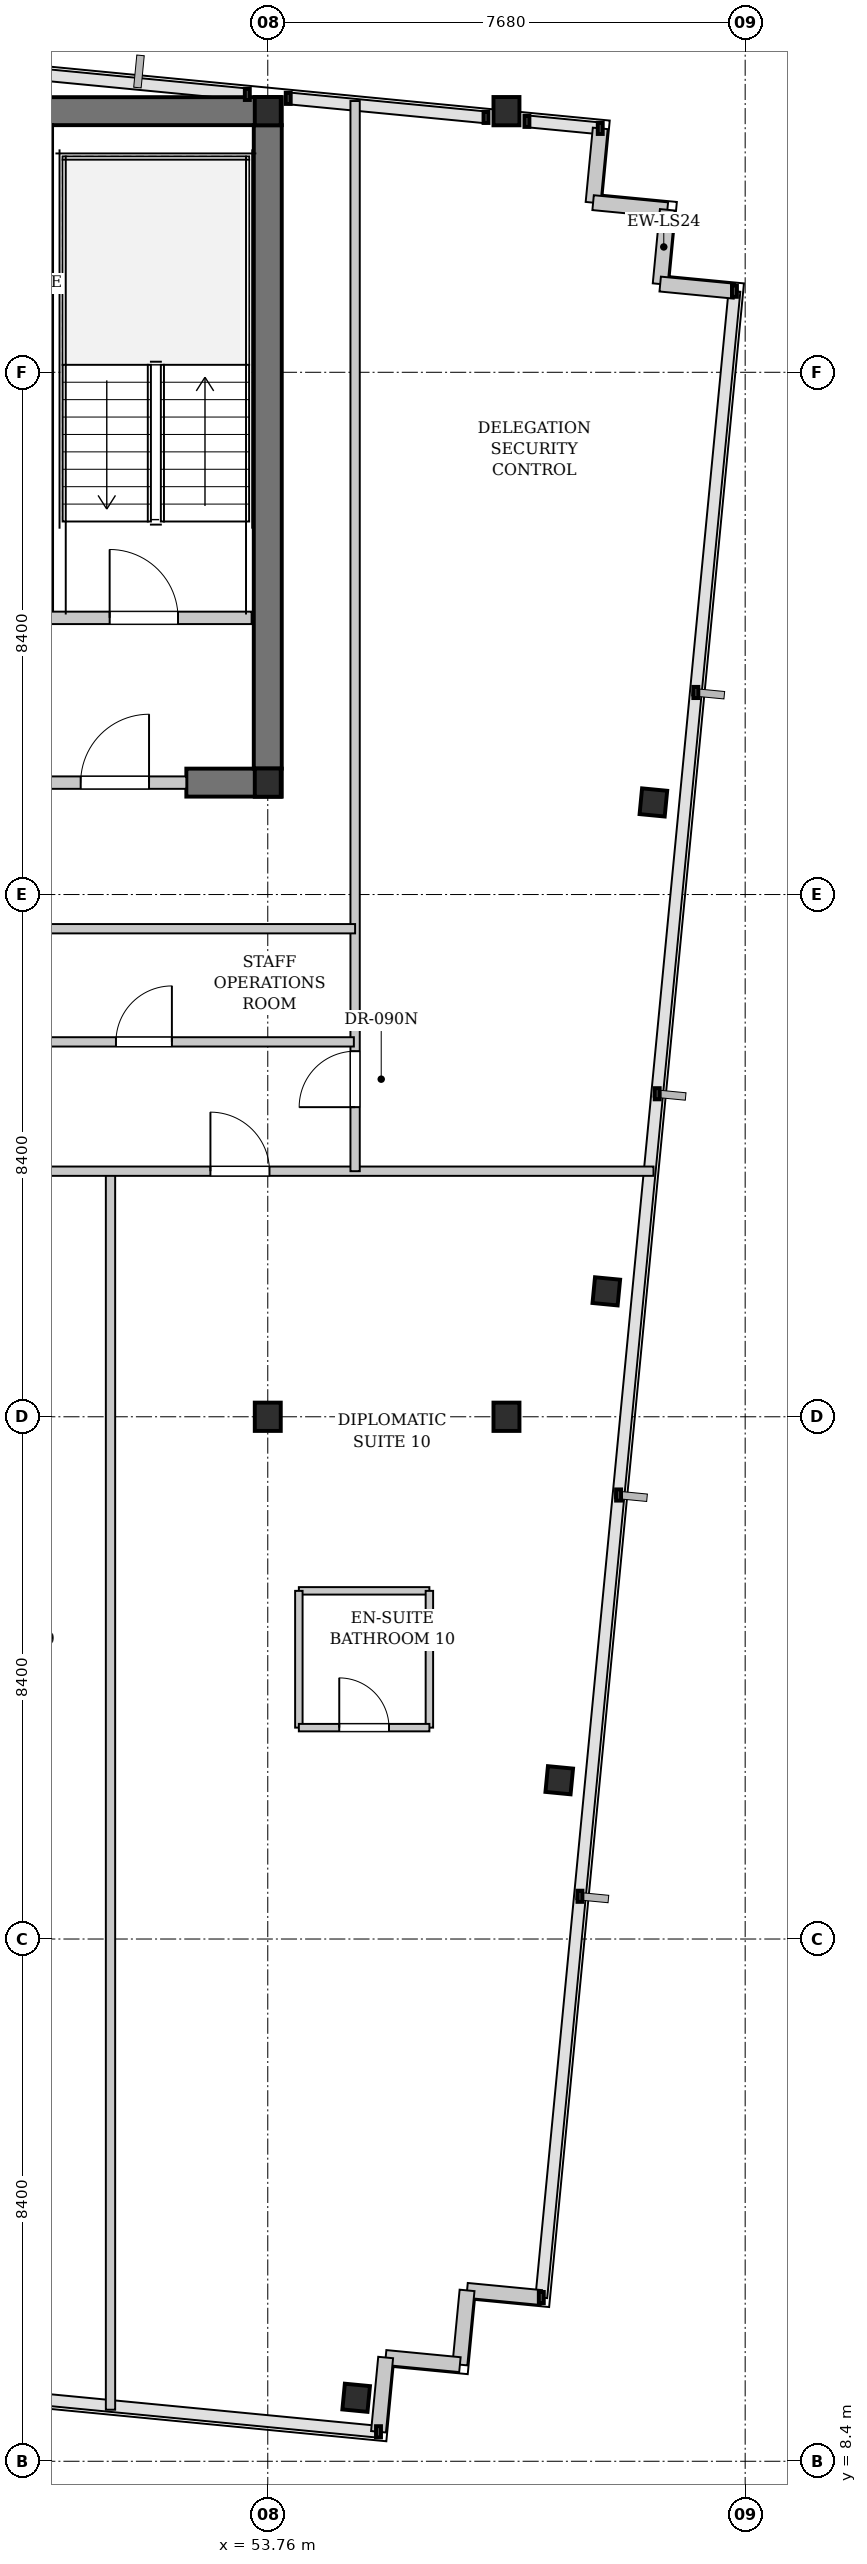
"""IFC4 building model, lengths in metres.
Left out: names, types, materials, properties, quantities, classifications, styles, units other than length and angle.
Written with IfcOpenShell. Run it as: python <this file> out.ifc"""

import sys

from ifc_helpers import new_model, si_unit, direction, frame, frame_2d, origin, origin_2d, place, context, subcontext, project, spatial, rectangle, i_section, extrude, element, fill, save


model = new_model("IFC4")
c1 = context("Model", 3, precision=1e-05, world=origin(), true_north=direction((0.0, 1.0)))
c2 = subcontext(c1, "Body", "Model", "MODEL_VIEW")
j1 = project(units=[si_unit("LENGTHUNIT", "METRE"), si_unit("PLANEANGLEUNIT", "RADIAN")], contexts=[c1])
p1 = place(None, origin())
s1 = spatial("IfcSite", under=j1, at=p1, CompositionType="ELEMENT")
p2 = place(p1, origin())
s2 = spatial("IfcBuilding", under=s1, at=p2, CompositionType="ELEMENT")
p3 = place(p2, frame((0.0, 0.0, 178.7)))
s3 = spatial("IfcBuildingStorey", under=s2, at=p3, CompositionType="ELEMENT", Elevation=178.7)
p4 = place(p3, frame((22.815, 46.2, 0.0), z_axis=(0.0, 0.0, 1.0), x_axis=(1.0, 0.0, 0.0)))
e1 = element("IfcWall", 1, at=p4, inside=s3, PredefinedType="SHEAR", context=c2, shape_type="SweptSolid", body=[
    extrude(rectangle(XDim=31.17, YDim=0.45, at=frame_2d((15.585, 0.0))), origin(), (0.0, 0.0, 1.0), 3.08),
])
p5 = place(p3, frame((52.45, 35.4, 0.0), z_axis=(0.0, 0.0, 1.0), x_axis=(1.0, 0.0, 0.0)))
e2 = element("IfcWall", 2, at=p5, inside=s3, PredefinedType="SHEAR", context=c2, shape_type="SweptSolid", body=[
    extrude(rectangle(XDim=1.535, YDim=0.45, at=frame_2d((0.768, 0.0))), origin(), (0.0, 0.0, 1.0), 3.08),
])
p6 = place(p3, frame((53.76, 35.625, 0.0), z_axis=(0.0, 0.0, 1.0), x_axis=(0.0, 1.0, 0.0)))
e3 = element("IfcWall", 3, at=p6, inside=s3, PredefinedType="SHEAR", context=c2, shape_type="SweptSolid", body=[
    extrude(rectangle(XDim=10.35, YDim=0.45, at=frame_2d((5.175, 0.0))), origin(), (0.0, 0.0, 1.0), 3.08),
])
for number, where, z_axis, x_axis in (
    (4, (53.76, 35.4, 0.0), (0.0, 0.0, 1.0), (1.0, 0.0, 0.0)),
    (5, (53.76, 46.2, 0.0), (0.0, 0.0, 1.0), (1.0, 0.0, 0.0)),
    (6, (53.76, 25.2, 0.0), (0.0, 0.0, 1.0), (1.0, 0.0, 0.0)),
    (7, (57.6, 25.2, 0.0), (0.0, 0.0, 1.0), (1.0, 0.0, 0.0)),
    (8, (57.6, 46.2, 0.0), (0.0, 0.0, 1.0), (1.0, 0.0, 0.0)),
):
    element("IfcColumn", number, at=place(p3, frame(where, z_axis=z_axis, x_axis=x_axis)), inside=s3, PredefinedType="COLUMN", context=c2, shape_type="SweptSolid", body=[
        extrude(i_section(OverallWidth=0.418, OverallDepth=0.455, WebThickness=0.042, FlangeThickness=0.068, FilletRadius=0.015, at=origin_2d()), origin(), (0.0, 0.0, 1.0), 3.3),
    ])
for number, where, z_axis, x_axis in (
    (9, (55.182, 9.421, 0.0), (0.0, 0.0, 1.0), (0.995, -0.096, 0.0)),
    (10, (58.449, 19.354, 0.0), (0.0, 0.0, 1.0), (0.995, -0.096, 0.0)),
    (11, (59.206, 27.218, 0.0), (0.0, 0.0, 1.0), (0.995, -0.096, 0.0)),
    (12, (59.963, 35.081, 0.0), (0.0, 0.0, 1.0), (0.995, -0.096, 0.0)),
):
    element("IfcColumn", number, at=place(p3, frame(where, z_axis=z_axis, x_axis=x_axis)), inside=s3, PredefinedType="COLUMN", context=c2, shape_type="SweptSolid", body=[
        extrude(i_section(OverallWidth=0.406, OverallDepth=0.416, WebThickness=0.03, FlangeThickness=0.048, FilletRadius=0.015, at=origin_2d()), origin(), (0.0, 0.0, 1.0), 3.3),
    ])
for number, where, z_axis, x_axis in (
    (13, (59.109, 45.923, 0.0), (0.0, 0.0, 1.0), (-0.096, -0.995, 0.0)),
    (14, (58.994, 44.729, 0.0), (0.0, 0.0, 1.0), (0.995, -0.096, 0.0)),
    (15, (60.188, 44.614, 0.0), (0.0, 0.0, 1.0), (-0.096, -0.995, 0.0)),
    (16, (60.073, 43.419, 0.0), (0.0, 0.0, 1.0), (0.995, -0.096, 0.0)),
    (17, (58.16, 11.033, 0.0), (0.0, 0.0, 1.0), (-0.995, 0.096, 0.0)),
):
    element("IfcWall", number, at=place(p3, frame(where, z_axis=z_axis, x_axis=x_axis)), inside=s3, PredefinedType="SOLIDWALL", context=c2, shape_type="SweptSolid", body=[
        extrude(rectangle(XDim=1.2, YDim=0.24, at=frame_2d((0.6, 0.0))), origin(), (0.0, 0.0, 1.0), 3.08),
    ])
for number, where, z_axis, x_axis in (
    (18, (56.966, 11.148, 0.0), (0.0, 0.0, 1.0), (-0.096, -0.995, 0.0)),
    (19, (56.851, 9.954, 0.0), (0.0, 0.0, 1.0), (-0.995, 0.096, 0.0)),
):
    element("IfcWall", number, at=place(p3, frame(where, z_axis=z_axis, x_axis=x_axis)), inside=s3, PredefinedType="SOLIDWALL", context=c2, shape_type="SweptSolid", body=[
        extrude(rectangle(XDim=1.2, YDim=0.24, at=frame_2d((0.6, 0.0))), origin(), (0.0, 0.0, 1.0), 3.08),
    ])
p7 = place(p3, frame((55.656, 10.069, 0.0), z_axis=(0.0, 0.0, 1.0), x_axis=(-0.095817067274, -0.995398960025, 0.0)))
e20 = element("IfcWall", 20, at=p7, inside=s3, PredefinedType="SOLIDWALL", context=c2, shape_type="SweptSolid", body=[
    extrude(rectangle(XDim=1.2, YDim=0.24, at=frame_2d((0.6, 0.0))), origin(), (0.0, 0.0, 1.0), 3.08),
])
p8 = place(p3, frame((49.78, 38.05, 0.0), z_axis=(0.0, 0.0, 1.0), x_axis=(1.0, 0.0, 0.0)))
e21 = element("IfcWall", 21, at=p8, inside=s3, PredefinedType="PARTITIONING", context=c2, shape_type="SweptSolid", body=[
    extrude(rectangle(XDim=3.72, YDim=0.2, at=frame_2d((1.86, 0.0))), origin(), (0.0, 0.0, 1.0), 3.08),
])
p9 = place(p8, frame((1.436, 0.0, 0.0)))
e22 = element("IfcOpeningElement", 22, at=p9, cuts=e21, PredefinedType="OPENING", context=c2, shape_type="SweptSolid", body=[
    extrude(rectangle(XDim=1.1, YDim=2.15, at=frame_2d((0.55, 1.075))), frame((0.0, 0.11, 0.0), z_axis=(0.0, -1.0, 0.0), x_axis=(1.0, 0.0, 0.0)), (0.0, 0.0, 1.0), 0.22),
])
p10 = place(p3, frame((50.15, 35.4, 0.0), z_axis=(0.0, 0.0, 1.0), x_axis=(1.0, 0.0, 0.0)))
e23 = element("IfcWall", 23, at=p10, inside=s3, PredefinedType="PARTITIONING", context=c2, shape_type="SweptSolid", body=[
    extrude(rectangle(XDim=2.3, YDim=0.2, at=frame_2d((1.15, 0.0))), origin(), (0.0, 0.0, 1.0), 2.475),
])
p11 = place(p10, frame((0.6, 0.0, 0.0)))
e24 = element("IfcOpeningElement", 24, at=p11, cuts=e23, PredefinedType="OPENING", context=c2, shape_type="SweptSolid", body=[
    extrude(rectangle(XDim=1.1, YDim=2.15, at=frame_2d((0.55, 1.075))), frame((0.0, 0.11, 0.0), z_axis=(0.0, -1.0, 0.0), x_axis=(1.0, 0.0, 0.0)), (0.0, 0.0, 1.0), 0.22),
])
p12 = place(p3, frame((54.26, 22.4, 0.0), z_axis=(0.0, 0.0, 1.0), x_axis=(1.0, 0.0, 0.0)))
e25 = element("IfcWall", 25, at=p12, inside=s3, PredefinedType="PARTITIONING", context=c2, shape_type="SweptSolid", body=[
    extrude(rectangle(XDim=2.1, YDim=0.12, at=frame_2d((1.05, 0.0))), origin(), (0.0, 0.0, 1.0), 3.08),
])
p13 = place(p3, frame((54.26, 20.2, 0.0), z_axis=(0.0, 0.0, 1.0), x_axis=(0.0, 1.0, 0.0)))
e26 = element("IfcWall", 26, at=p13, inside=s3, PredefinedType="PARTITIONING", context=c2, shape_type="SweptSolid", body=[
    extrude(rectangle(XDim=2.2, YDim=0.12, at=frame_2d((1.1, 0.0))), origin(), (0.0, 0.0, 1.0), 2.475),
])
p14 = place(p3, frame((56.36, 20.2, 0.0), z_axis=(0.0, 0.0, 1.0), x_axis=(0.0, 1.0, 0.0)))
e27 = element("IfcWall", 27, at=p14, inside=s3, PredefinedType="PARTITIONING", context=c2, shape_type="SweptSolid", body=[
    extrude(rectangle(XDim=2.2, YDim=0.12, at=frame_2d((1.1, 0.0))), origin(), (0.0, 0.0, 1.0), 3.08),
])
p15 = place(p3, frame((54.26, 20.2, 0.0), z_axis=(0.0, 0.0, 1.0), x_axis=(1.0, 0.0, 0.0)))
e28 = element("IfcWall", 28, at=p15, inside=s3, PredefinedType="PARTITIONING", context=c2, shape_type="SweptSolid", body=[
    extrude(rectangle(XDim=2.1, YDim=0.12, at=frame_2d((1.05, 0.0))), origin(), (0.0, 0.0, 1.0), 3.08),
])
p16 = place(p15, frame((0.65, 0.0, 0.0)))
e29 = element("IfcOpeningElement", 29, at=p16, cuts=e28, PredefinedType="OPENING", context=c2, shape_type="SweptSolid", body=[
    extrude(rectangle(XDim=0.8, YDim=2.1, at=frame_2d((0.4, 1.05))), frame((0.0, 0.07, 0.0), z_axis=(0.0, -1.0, 0.0), x_axis=(1.0, 0.0, 0.0)), (0.0, 0.0, 1.0), 0.14),
])
p17 = place(p3, frame((51.23, 9.229, 0.0), z_axis=(0.0, 0.0, 1.0), x_axis=(0.0, 1.0, 0.0)))
e30 = element("IfcWall", 30, at=p17, inside=s3, PredefinedType="PARTITIONING", context=c2, shape_type="SweptSolid", body=[
    extrude(rectangle(XDim=19.941, YDim=0.15, at=frame_2d((9.97, 0.0))), origin(), (0.0, 0.0, 1.0), 3.08),
])
p18 = place(p3, frame((2.46, 29.15, 0.0), z_axis=(0.0, 0.0, 1.0), x_axis=(1.0, 0.0, 0.0)))
e31 = element("IfcWall", 31, at=p18, inside=s3, PredefinedType="PARTITIONING", context=c2, shape_type="SweptSolid", body=[
    extrude(rectangle(XDim=57.505, YDim=0.15, at=frame_2d((28.752, 0.0))), origin(), (0.0, 0.0, 1.0), 2.475),
])
p19 = place(p18, frame((7.987, 0.0, 0.0)))
e32 = element("IfcOpeningElement", 32, at=p19, cuts=e31, PredefinedType="OPENING", context=c2, shape_type="SweptSolid", body=[
    extrude(rectangle(XDim=0.95, YDim=2.15, at=frame_2d((0.475, 1.075))), frame((0.0, 0.085, 0.0), z_axis=(0.0, -1.0, 0.0), x_axis=(1.0, 0.0, 0.0)), (0.0, 0.0, 1.0), 0.17),
])
p20 = place(p18, frame((11.483, 0.0, 0.0)))
e33 = element("IfcOpeningElement", 33, at=p20, cuts=e31, PredefinedType="OPENING", context=c2, shape_type="SweptSolid", body=[
    extrude(rectangle(XDim=0.95, YDim=2.15, at=frame_2d((0.475, 1.075))), frame((0.0, 0.085, 0.0), z_axis=(0.0, -1.0, 0.0), x_axis=(1.0, 0.0, 0.0)), (0.0, 0.0, 1.0), 0.17),
])
p21 = place(p18, frame((15.951, 0.0, 0.0)))
e34 = element("IfcOpeningElement", 34, at=p21, cuts=e31, PredefinedType="OPENING", context=c2, shape_type="SweptSolid", body=[
    extrude(rectangle(XDim=0.95, YDim=2.15, at=frame_2d((0.475, 1.075))), frame((0.0, 0.085, 0.0), z_axis=(0.0, -1.0, 0.0), x_axis=(1.0, 0.0, 0.0)), (0.0, 0.0, 1.0), 0.17),
])
p22 = place(p18, frame((20.991, 0.0, 0.0)))
e35 = element("IfcOpeningElement", 35, at=p22, cuts=e31, PredefinedType="OPENING", context=c2, shape_type="SweptSolid", body=[
    extrude(rectangle(XDim=0.95, YDim=2.15, at=frame_2d((0.475, 1.075))), frame((0.0, 0.085, 0.0), z_axis=(0.0, -1.0, 0.0), x_axis=(1.0, 0.0, 0.0)), (0.0, 0.0, 1.0), 0.17),
])
p23 = place(p18, frame((26.032, 0.0, 0.0)))
e36 = element("IfcOpeningElement", 36, at=p23, cuts=e31, PredefinedType="OPENING", context=c2, shape_type="SweptSolid", body=[
    extrude(rectangle(XDim=0.95, YDim=2.15, at=frame_2d((0.475, 1.075))), frame((0.0, 0.085, 0.0), z_axis=(0.0, -1.0, 0.0), x_axis=(1.0, 0.0, 0.0)), (0.0, 0.0, 1.0), 0.17),
])
p24 = place(p18, frame((31.072, 0.0, 0.0)))
e37 = element("IfcOpeningElement", 37, at=p24, cuts=e31, PredefinedType="OPENING", context=c2, shape_type="SweptSolid", body=[
    extrude(rectangle(XDim=0.95, YDim=2.15, at=frame_2d((0.475, 1.075))), frame((0.0, 0.085, 0.0), z_axis=(0.0, -1.0, 0.0), x_axis=(1.0, 0.0, 0.0)), (0.0, 0.0, 1.0), 0.17),
])
p25 = place(p18, frame((36.113, 0.0, 0.0)))
e38 = element("IfcOpeningElement", 38, at=p25, cuts=e31, PredefinedType="OPENING", context=c2, shape_type="SweptSolid", body=[
    extrude(rectangle(XDim=0.95, YDim=2.15, at=frame_2d((0.475, 1.075))), frame((0.0, 0.085, 0.0), z_axis=(0.0, -1.0, 0.0), x_axis=(1.0, 0.0, 0.0)), (0.0, 0.0, 1.0), 0.17),
])
p26 = place(p18, frame((41.154, 0.0, 0.0)))
e39 = element("IfcOpeningElement", 39, at=p26, cuts=e31, PredefinedType="OPENING", context=c2, shape_type="SweptSolid", body=[
    extrude(rectangle(XDim=0.95, YDim=2.15, at=frame_2d((0.475, 1.075))), frame((0.0, 0.085, 0.0), z_axis=(0.0, -1.0, 0.0), x_axis=(1.0, 0.0, 0.0)), (0.0, 0.0, 1.0), 0.17),
])
p27 = place(p18, frame((46.042, 0.0, 0.0)))
e40 = element("IfcOpeningElement", 40, at=p27, cuts=e31, PredefinedType="OPENING", context=c2, shape_type="SweptSolid", body=[
    extrude(rectangle(XDim=0.95, YDim=2.15, at=frame_2d((0.475, 1.075))), frame((0.0, 0.085, 0.0), z_axis=(0.0, -1.0, 0.0), x_axis=(1.0, 0.0, 0.0)), (0.0, 0.0, 1.0), 0.17),
])
p28 = place(p18, frame((50.377, 0.0, 0.0)))
e41 = element("IfcOpeningElement", 41, at=p28, cuts=e31, PredefinedType="OPENING", context=c2, shape_type="SweptSolid", body=[
    extrude(rectangle(XDim=0.95, YDim=2.15, at=frame_2d((0.475, 1.075))), frame((0.0, 0.085, 0.0), z_axis=(0.0, -1.0, 0.0), x_axis=(1.0, 0.0, 0.0)), (0.0, 0.0, 1.0), 0.17),
])
p29 = place(p3, frame((55.165, 29.15, 0.0), z_axis=(0.0, 0.0, 1.0), x_axis=(0.0, 1.0, 0.0)))
e42 = element("IfcWall", 42, at=p29, inside=s3, PredefinedType="PARTITIONING", context=c2, shape_type="SweptSolid", body=[
    extrude(rectangle(XDim=17.213, YDim=0.15, at=frame_2d((8.606, 0.0))), origin(), (0.0, 0.0, 1.0), 3.08),
])
p30 = place(p29, frame((1.03, 0.0, 0.0)))
e43 = element("IfcOpeningElement", 43, at=p30, cuts=e42, PredefinedType="OPENING", context=c2, shape_type="SweptSolid", body=[
    extrude(rectangle(XDim=0.9, YDim=2.15, at=frame_2d((0.45, 1.075))), frame((0.0, 0.085, 0.0), z_axis=(0.0, -1.0, 0.0), x_axis=(1.0, 0.0, 0.0)), (0.0, 0.0, 1.0), 0.17),
])
p31 = place(p3, frame((48.38, 33.05, 0.0), z_axis=(0.0, 0.0, 1.0), x_axis=(1.0, 0.0, 0.0)))
e44 = element("IfcWall", 44, at=p31, inside=s3, PredefinedType="PARTITIONING", context=c2, shape_type="SweptSolid", body=[
    extrude(rectangle(XDim=6.785, YDim=0.15, at=frame_2d((3.393, 0.0))), origin(), (0.0, 0.0, 1.0), 3.08),
])
p32 = place(p3, frame((48.39, 31.23, 0.0), z_axis=(0.0, 0.0, 1.0), x_axis=(1.0, 0.0, 0.0)))
e45 = element("IfcWall", 45, at=p32, inside=s3, PredefinedType="PARTITIONING", context=c2, shape_type="SweptSolid", body=[
    extrude(rectangle(XDim=6.755, YDim=0.15, at=frame_2d((3.377, 0.0))), origin(), (0.0, 0.0, 1.0), 3.08),
])
p33 = place(p32, frame((2.927, 0.0, 0.0)))
e46 = element("IfcOpeningElement", 46, at=p33, cuts=e45, PredefinedType="OPENING", context=c2, shape_type="SweptSolid", body=[
    extrude(rectangle(XDim=0.9, YDim=2.15, at=frame_2d((0.45, 1.075))), frame((0.0, 0.085, 0.0), z_axis=(0.0, -1.0, 0.0), x_axis=(1.0, 0.0, 0.0)), (0.0, 0.0, 1.0), 0.17),
])
p34 = place(p9, origin())
e47 = element("IfcDoor", 47, at=p34, inside=s3, OperationType="SINGLE_SWING_LEFT", PredefinedType="DOOR", context=c2, shape_type="SweptSolid", body=[
    extrude(rectangle(XDim=1.1, YDim=2.15, at=frame_2d((0.55, 1.075))), frame((0.0, 0.025, 0.0), z_axis=(0.0, -1.0, 0.0), x_axis=(1.0, 0.0, 0.0)), (0.0, 0.0, 1.0), 0.05),
])
fill(e22, e47)
p35 = place(p11, origin())
e48 = element("IfcDoor", 48, at=p35, inside=s3, OperationType="SINGLE_SWING_RIGHT", PredefinedType="DOOR", context=c2, shape_type="SweptSolid", body=[
    extrude(rectangle(XDim=1.1, YDim=2.15, at=frame_2d((0.55, 1.075))), frame((0.0, 0.025, 0.0), z_axis=(0.0, -1.0, 0.0), x_axis=(1.0, 0.0, 0.0)), (0.0, 0.0, 1.0), 0.05),
])
fill(e24, e48)
p36 = place(p16, origin())
e49 = element("IfcDoor", 49, at=p36, inside=s3, OperationType="SINGLE_SWING_LEFT", PredefinedType="DOOR", context=c2, shape_type="SweptSolid", body=[
    extrude(rectangle(XDim=0.8, YDim=2.1, at=frame_2d((0.4, 1.05))), frame((0.0, 0.025, 0.0), z_axis=(0.0, -1.0, 0.0), x_axis=(1.0, 0.0, 0.0)), (0.0, 0.0, 1.0), 0.05),
])
fill(e29, e49)
p37 = place(p28, origin())
e50 = element("IfcDoor", 50, at=p37, inside=s3, OperationType="SINGLE_SWING_LEFT", PredefinedType="DOOR", context=c2, shape_type="SweptSolid", body=[
    extrude(rectangle(XDim=0.95, YDim=2.15, at=frame_2d((0.475, 1.075))), frame((0.0, 0.025, 0.0), z_axis=(0.0, -1.0, 0.0), x_axis=(1.0, 0.0, 0.0)), (0.0, 0.0, 1.0), 0.05),
])
fill(e41, e50)
p38 = place(p30, origin())
e51 = element("IfcDoor", 51, at=p38, inside=s3, OperationType="SINGLE_SWING_LEFT", PredefinedType="DOOR", context=c2, shape_type="SweptSolid", body=[
    extrude(rectangle(XDim=0.9, YDim=2.15, at=frame_2d((0.45, 1.075))), frame((0.0, 0.025, 0.0), z_axis=(0.0, -1.0, 0.0), x_axis=(1.0, 0.0, 0.0)), (0.0, 0.0, 1.0), 0.05),
])
fill(e43, e51)
p39 = place(p33, origin())
e52 = element("IfcDoor", 52, at=p39, inside=s3, OperationType="SINGLE_SWING_RIGHT", PredefinedType="DOOR", context=c2, shape_type="SweptSolid", body=[
    extrude(rectangle(XDim=0.9, YDim=2.15, at=frame_2d((0.45, 1.075))), frame((0.0, 0.025, 0.0), z_axis=(0.0, -1.0, 0.0), x_axis=(1.0, 0.0, 0.0)), (0.0, 0.0, 1.0), 0.05),
])
fill(e46, e52)
save(model, sys.argv[1])
